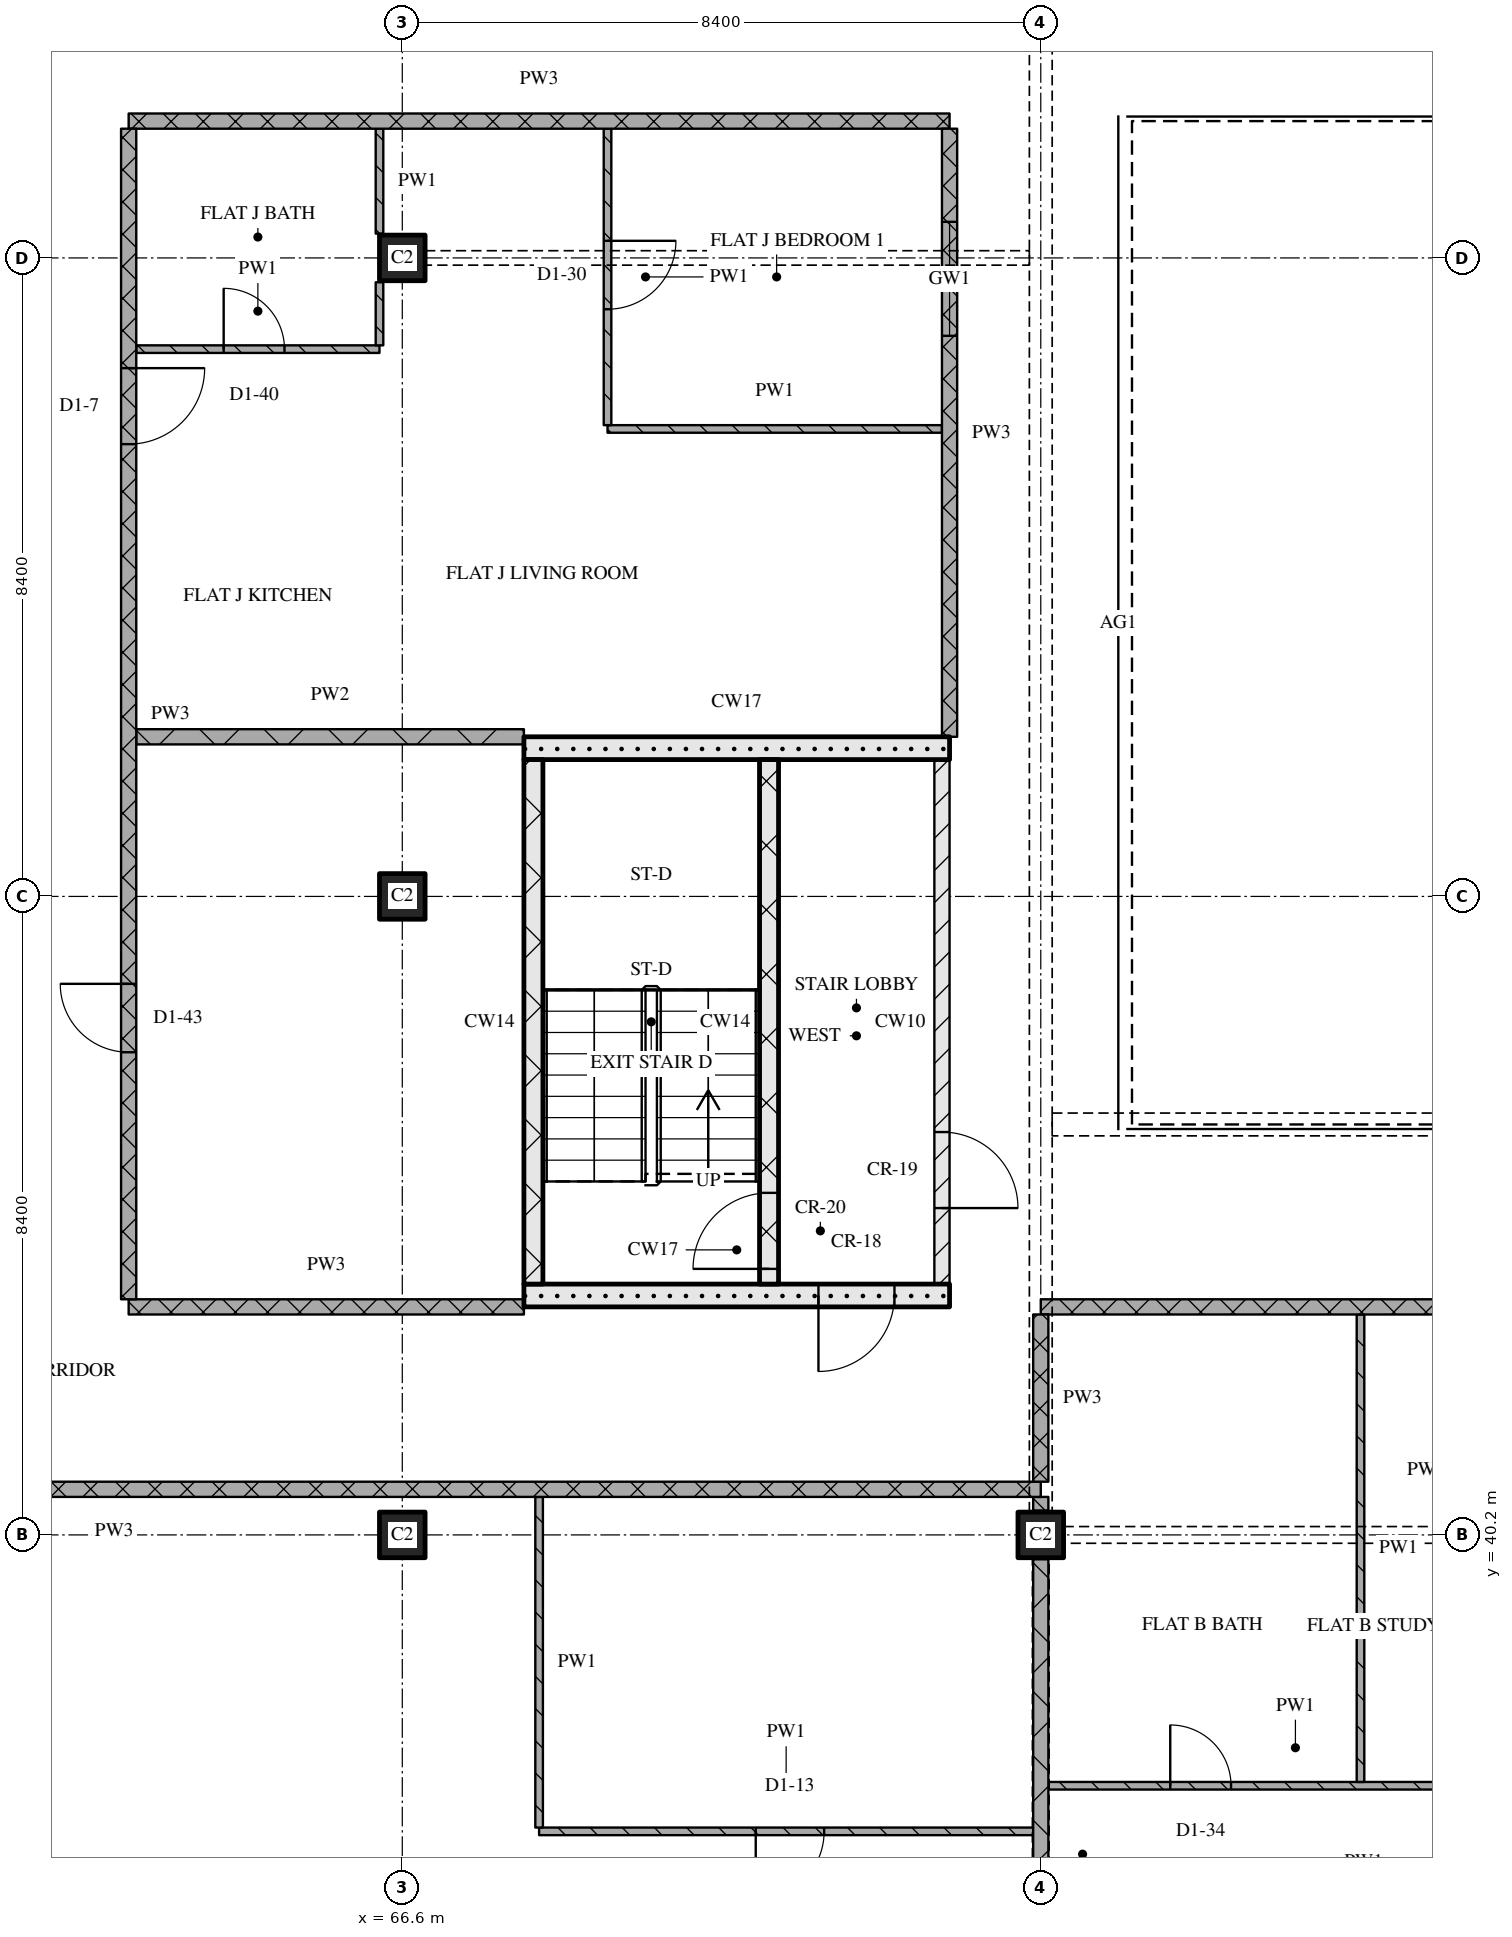
"""IFC4 building model, lengths in metres.
Left out: names, types, materials, properties, quantities, classifications, styles, units other than length and angle.
Written with IfcOpenShell. Run it as: python <this file> out.ifc"""

import sys

from ifc_helpers import new_model, si_unit, direction, frame, frame_2d, origin, origin_2d, place, context, subcontext, project, spatial, rectangle, extrude, element, fill, save


model = new_model("IFC4")
c1 = context("Model", 3, precision=1e-05, world=origin(), true_north=direction((0.0, 1.0)))
c2 = subcontext(c1, "Body", "Model", "MODEL_VIEW")
j1 = project(units=[si_unit("LENGTHUNIT", "METRE"), si_unit("PLANEANGLEUNIT", "RADIAN")], contexts=[c1])
p1 = place(None, origin())
s1 = spatial("IfcSite", under=j1, at=p1, CompositionType="ELEMENT")
p2 = place(p1, origin())
s2 = spatial("IfcBuilding", under=s1, at=p2, CompositionType="ELEMENT")
p3 = place(p2, frame((0.0, 0.0, 212.7)))
s3 = spatial("IfcBuildingStorey", under=s2, at=p3, CompositionType="ELEMENT", Elevation=212.7)
for number, where, z_axis, x_axis in (
    (1, (66.6, 40.2, 0.0), (0.0, 0.0, 1.0), (1.0, 0.0, 0.0)),
    (2, (66.6, 48.6, 0.0), (0.0, 0.0, 1.0), (1.0, 0.0, 0.0)),
    (3, (66.6, 57.0, 0.0), (0.0, 0.0, 1.0), (1.0, 0.0, 0.0)),
    (4, (75.0, 40.2, 0.0), (0.0, 0.0, 1.0), (1.0, 0.0, 0.0)),
):
    element("IfcColumn", number, at=place(p3, frame(where, z_axis=z_axis, x_axis=x_axis)), inside=s3, PredefinedType="COLUMN", context=c2, shape_type="SweptSolid", body=[
        extrude(rectangle(XDim=0.6, YDim=0.6, at=origin_2d()), origin(), (0.0, 0.0, 1.0), 3.6),
    ])
p4 = place(p3, frame((68.2, 43.35, 0.0), z_axis=(0.0, 0.0, 1.0), x_axis=(1.0, 0.0, 0.0)))
e5 = element("IfcWall", 5, at=p4, inside=s3, PredefinedType="SOLIDWALL", context=c2, shape_type="SweptSolid", body=[
    extrude(rectangle(XDim=5.6, YDim=0.3, at=frame_2d((2.8, 0.0))), origin(), (0.0, 0.0, 1.0), 3.32),
])
p5 = place(p4, frame((3.875, 0.0, 0.0)))
e6 = element("IfcOpeningElement", 6, at=p5, cuts=e5, PredefinedType="OPENING", context=c2, shape_type="SweptSolid", body=[
    extrude(rectangle(XDim=1.0, YDim=2.1, at=frame_2d((0.5, 1.05))), frame((0.0, 0.16, 0.0), z_axis=(0.0, -1.0, 0.0), x_axis=(1.0, 0.0, 0.0)), (0.0, 0.0, 1.0), 0.32),
])
p6 = place(p3, frame((68.325, 43.5, 0.0), z_axis=(0.0, 0.0, 1.0), x_axis=(0.0, 1.0, 0.0)))
e7 = element("IfcWall", 7, at=p6, inside=s3, PredefinedType="SOLIDWALL", context=c2, shape_type="SweptSolid", body=[
    extrude(rectangle(XDim=6.9, YDim=0.25, at=frame_2d((3.45, 0.0))), origin(), (0.0, 0.0, 1.0), 3.32),
])
p7 = place(p3, frame((71.425, 43.5, 0.0), z_axis=(0.0, 0.0, 1.0), x_axis=(0.0, 1.0, 0.0)))
e8 = element("IfcWall", 8, at=p7, inside=s3, PredefinedType="SOLIDWALL", context=c2, shape_type="SweptSolid", body=[
    extrude(rectangle(XDim=6.9, YDim=0.25, at=frame_2d((3.45, 0.0))), origin(), (0.0, 0.0, 1.0), 3.32),
])
p8 = place(p7, frame((0.2, 0.0, 0.0)))
e9 = element("IfcOpeningElement", 9, at=p8, cuts=e8, PredefinedType="OPENING", context=c2, shape_type="SweptSolid", body=[
    extrude(rectangle(XDim=1.0, YDim=2.1, at=frame_2d((0.5, 1.05))), frame((0.0, 0.135, 0.0), z_axis=(0.0, -1.0, 0.0), x_axis=(1.0, 0.0, 0.0)), (0.0, 0.0, 1.0), 0.27),
])
p9 = place(p3, frame((73.7, 43.5, 0.0), z_axis=(0.0, 0.0, 1.0), x_axis=(0.0, 1.0, 0.0)))
e10 = element("IfcWall", 10, at=p9, inside=s3, PredefinedType="PARTITIONING", context=c2, shape_type="SweptSolid", body=[
    extrude(rectangle(XDim=6.9, YDim=0.2, at=frame_2d((3.45, 0.0))), origin(), (0.0, 0.0, 1.0), 3.32),
])
p10 = place(p9, frame((1.0, 0.0, 0.0)))
e11 = element("IfcOpeningElement", 11, at=p10, cuts=e10, PredefinedType="OPENING", context=c2, shape_type="SweptSolid", body=[
    extrude(rectangle(XDim=1.0, YDim=2.1, at=frame_2d((0.5, 1.05))), frame((0.0, 0.11, 0.0), z_axis=(0.0, -1.0, 0.0), x_axis=(1.0, 0.0, 0.0)), (0.0, 0.0, 1.0), 0.22),
])
p11 = place(p3, frame((68.2, 50.55, 0.0), z_axis=(0.0, 0.0, 1.0), x_axis=(1.0, 0.0, 0.0)))
e12 = element("IfcWall", 12, at=p11, inside=s3, PredefinedType="SOLIDWALL", context=c2, shape_type="SweptSolid", body=[
    extrude(rectangle(XDim=5.6, YDim=0.3, at=frame_2d((2.8, 0.0))), origin(), (0.0, 0.0, 1.0), 3.32),
])
p12 = place(p3, frame((68.4, 36.3, 0.0), z_axis=(0.0, 0.0, 1.0), x_axis=(1.0, 0.0, 0.0)))
e13 = element("IfcWall", 13, at=p12, inside=s3, PredefinedType="PARTITIONING", context=c2, shape_type="SweptSolid", body=[
    extrude(rectangle(XDim=6.5, YDim=0.1, at=frame_2d((3.25, 0.0))), origin(), (0.0, 0.0, 1.0), 3.32),
])
p13 = place(p12, frame((2.85, 0.0, 0.0)))
e14 = element("IfcOpeningElement", 14, at=p13, cuts=e13, PredefinedType="OPENING", context=c2, shape_type="SweptSolid", body=[
    extrude(rectangle(XDim=0.9, YDim=2.1, at=frame_2d((0.45, 1.05))), frame((0.0, 0.06, 0.0), z_axis=(0.0, -1.0, 0.0), x_axis=(1.0, 0.0, 0.0)), (0.0, 0.0, 1.0), 0.12),
])
p14 = place(p3, frame((75.1, 36.9, 0.0), z_axis=(0.0, 0.0, 1.0), x_axis=(1.0, 0.0, 0.0)))
e15 = element("IfcWall", 15, at=p14, inside=s3, PredefinedType="PARTITIONING", context=c2, shape_type="SweptSolid", body=[
    extrude(rectangle(XDim=6.5, YDim=0.1, at=frame_2d((3.25, 0.0))), origin(), (0.0, 0.0, 1.0), 3.32),
])
p15 = place(p14, frame((1.603, 0.0, 0.0)))
e16 = element("IfcOpeningElement", 16, at=p15, cuts=e15, PredefinedType="OPENING", context=c2, shape_type="SweptSolid", body=[
    extrude(rectangle(XDim=0.8, YDim=2.1, at=frame_2d((0.4, 1.05))), frame((0.0, 0.06, 0.0), z_axis=(0.0, -1.0, 0.0), x_axis=(1.0, 0.0, 0.0)), (0.0, 0.0, 1.0), 0.12),
])
p16 = place(p3, frame((75.0, 40.8, 0.0), z_axis=(0.0, 0.0, 1.0), x_axis=(-1.0, 0.0, 0.0)))
e17 = element("IfcWall", 17, at=p16, inside=s3, PredefinedType="PARTITIONING", context=c2, shape_type="SweptSolid", body=[
    extrude(rectangle(XDim=24.38, YDim=0.2, at=frame_2d((12.19, 0.0))), origin(), (0.0, 0.0, 1.0), 3.32),
])
p17 = place(p16, frame((14.35, 0.0, 0.0)))
e18 = element("IfcOpeningElement", 18, at=p17, cuts=e17, PredefinedType="OPENING", context=c2, shape_type="SweptSolid", body=[
    extrude(rectangle(XDim=1.0, YDim=2.1, at=frame_2d((0.5, 1.05))), frame((0.0, 0.11, 0.0), z_axis=(0.0, -1.0, 0.0), x_axis=(1.0, 0.0, 0.0)), (0.0, 0.0, 1.0), 0.22),
])
p18 = place(p3, frame((63.0, 43.2, 0.0), z_axis=(0.0, 0.0, 1.0), x_axis=(1.0, 0.0, 0.0)))
e19 = element("IfcWall", 19, at=p18, inside=s3, PredefinedType="PARTITIONING", context=c2, shape_type="SweptSolid", body=[
    extrude(rectangle(XDim=5.2, YDim=0.2, at=frame_2d((2.6, 0.0))), origin(), (0.0, 0.0, 1.0), 3.32),
])
p19 = place(p3, frame((100.2, 43.2, 0.0), z_axis=(0.0, 0.0, 1.0), x_axis=(-1.0, 0.0, 0.0)))
e20 = element("IfcWall", 20, at=p19, inside=s3, PredefinedType="PARTITIONING", context=c2, shape_type="SweptSolid", body=[
    extrude(rectangle(XDim=25.2, YDim=0.2, at=frame_2d((12.6, 0.0))), origin(), (0.0, 0.0, 1.0), 3.32),
])
p20 = place(p19, frame((4.15, 0.0, 0.0)))
e21 = element("IfcOpeningElement", 21, at=p20, cuts=e20, PredefinedType="OPENING", context=c2, shape_type="SweptSolid", body=[
    extrude(rectangle(XDim=1.0, YDim=2.1, at=frame_2d((0.5, 1.05))), frame((0.0, 0.11, 0.0), z_axis=(0.0, -1.0, 0.0), x_axis=(1.0, 0.0, 0.0)), (0.0, 0.0, 1.0), 0.22),
])
p21 = place(p19, frame((17.35, 0.0, 0.0)))
e22 = element("IfcOpeningElement", 22, at=p21, cuts=e20, PredefinedType="OPENING", context=c2, shape_type="SweptSolid", body=[
    extrude(rectangle(XDim=1.0, YDim=2.1, at=frame_2d((0.5, 1.05))), frame((0.0, 0.11, 0.0), z_axis=(0.0, -1.0, 0.0), x_axis=(1.0, 0.0, 0.0)), (0.0, 0.0, 1.0), 0.22),
])
p22 = place(p3, frame((63.1, 50.7, 0.0), z_axis=(0.0, 0.0, 1.0), x_axis=(1.0, 0.0, 0.0)))
e23 = element("IfcWall", 23, at=p22, inside=s3, PredefinedType="PARTITIONING", context=c2, shape_type="SweptSolid", body=[
    extrude(rectangle(XDim=5.1, YDim=0.2, at=frame_2d((2.55, 0.0))), origin(), (0.0, 0.0, 1.0), 3.32),
])
p23 = place(p3, frame((69.3, 54.75, 0.0), z_axis=(0.0, 0.0, 1.0), x_axis=(1.0, 0.0, 0.0)))
e24 = element("IfcWall", 24, at=p23, inside=s3, PredefinedType="PARTITIONING", context=c2, shape_type="SweptSolid", body=[
    extrude(rectangle(XDim=4.4, YDim=0.1, at=frame_2d((2.2, 0.0))), origin(), (0.0, 0.0, 1.0), 3.32),
])
p24 = place(p3, frame((63.1, 55.8, 0.0), z_axis=(0.0, 0.0, 1.0), x_axis=(1.0, 0.0, 0.0)))
e25 = element("IfcWall", 25, at=p24, inside=s3, PredefinedType="PARTITIONING", context=c2, shape_type="SweptSolid", body=[
    extrude(rectangle(XDim=3.2, YDim=0.1, at=frame_2d((1.6, 0.0))), origin(), (0.0, 0.0, 1.0), 3.32),
])
p25 = place(p24, frame((1.15, 0.0, 0.0)))
e26 = element("IfcOpeningElement", 26, at=p25, cuts=e25, PredefinedType="OPENING", context=c2, shape_type="SweptSolid", body=[
    extrude(rectangle(XDim=0.8, YDim=2.1, at=frame_2d((0.4, 1.05))), frame((0.0, 0.06, 0.0), z_axis=(0.0, -1.0, 0.0), x_axis=(1.0, 0.0, 0.0)), (0.0, 0.0, 1.0), 0.12),
])
p26 = place(p3, frame((63.0, 58.8, 0.0), z_axis=(0.0, 0.0, 1.0), x_axis=(1.0, 0.0, 0.0)))
e27 = element("IfcWall", 27, at=p26, inside=s3, PredefinedType="PARTITIONING", context=c2, shape_type="SweptSolid", body=[
    extrude(rectangle(XDim=10.8, YDim=0.2, at=frame_2d((5.4, 0.0))), origin(), (0.0, 0.0, 1.0), 3.32),
])
p27 = place(p3, frame((63.0, 58.7, 0.0), z_axis=(0.0, 0.0, 1.0), x_axis=(0.0, -1.0, 0.0)))
e28 = element("IfcWall", 28, at=p27, inside=s3, PredefinedType="PARTITIONING", context=c2, shape_type="SweptSolid", body=[
    extrude(rectangle(XDim=15.4, YDim=0.2, at=frame_2d((7.7, 0.0))), origin(), (0.0, 0.0, 1.0), 3.32),
])
p28 = place(p27, frame((3.15, 0.0, 0.0)))
e29 = element("IfcOpeningElement", 29, at=p28, cuts=e28, PredefinedType="OPENING", context=c2, shape_type="SweptSolid", body=[
    extrude(rectangle(XDim=1.0, YDim=2.1, at=frame_2d((0.5, 1.05))), frame((0.0, 0.11, 0.0), z_axis=(0.0, -1.0, 0.0), x_axis=(1.0, 0.0, 0.0)), (0.0, 0.0, 1.0), 0.22),
])
p29 = place(p27, frame((11.25, 0.0, 0.0)))
e30 = element("IfcOpeningElement", 30, at=p29, cuts=e28, PredefinedType="OPENING", context=c2, shape_type="SweptSolid", body=[
    extrude(rectangle(XDim=0.9, YDim=2.1, at=frame_2d((0.45, 1.05))), frame((0.0, 0.11, 0.0), z_axis=(0.0, -1.0, 0.0), x_axis=(1.0, 0.0, 0.0)), (0.0, 0.0, 1.0), 0.22),
])
p30 = place(p3, frame((66.3, 56.68, 0.0), z_axis=(0.0, 0.0, 1.0), x_axis=(0.0, -1.0, 0.0)))
e31 = element("IfcWall", 31, at=p30, inside=s3, PredefinedType="PARTITIONING", context=c2, shape_type="SweptSolid", body=[
    extrude(rectangle(XDim=0.83, YDim=0.1, at=frame_2d((0.415, 0.0))), origin(), (0.0, 0.0, 1.0), 3.32),
])
p31 = place(p3, frame((66.3, 58.7, 0.0), z_axis=(0.0, 0.0, 1.0), x_axis=(0.0, -1.0, 0.0)))
e32 = element("IfcWall", 32, at=p31, inside=s3, PredefinedType="PARTITIONING", context=c2, shape_type="SweptSolid", body=[
    extrude(rectangle(XDim=1.38, YDim=0.1, at=frame_2d((0.69, 0.0))), origin(), (0.0, 0.0, 1.0), 3.32),
])
p32 = place(p3, frame((68.4, 40.7, 0.0), z_axis=(0.0, 0.0, 1.0), x_axis=(0.0, -1.0, 0.0)))
e33 = element("IfcWall", 33, at=p32, inside=s3, PredefinedType="PARTITIONING", context=c2, shape_type="SweptSolid", body=[
    extrude(rectangle(XDim=4.35, YDim=0.1, at=frame_2d((2.175, 0.0))), origin(), (0.0, 0.0, 1.0), 3.32),
])
p33 = place(p3, frame((69.3, 58.7, 0.0), z_axis=(0.0, 0.0, 1.0), x_axis=(0.0, -1.0, 0.0)))
e34 = element("IfcWall", 34, at=p33, inside=s3, PredefinedType="PARTITIONING", context=c2, shape_type="SweptSolid", body=[
    extrude(rectangle(XDim=3.9, YDim=0.1, at=frame_2d((1.95, 0.0))), origin(), (0.0, 0.0, 1.0), 3.32),
])
p34 = place(p33, frame((1.475, 0.0, 0.0)))
e35 = element("IfcOpeningElement", 35, at=p34, cuts=e34, PredefinedType="OPENING", context=c2, shape_type="SweptSolid", body=[
    extrude(rectangle(XDim=0.9, YDim=2.1, at=frame_2d((0.45, 1.05))), frame((0.0, 0.06, 0.0), z_axis=(0.0, -1.0, 0.0), x_axis=(1.0, 0.0, 0.0)), (0.0, 0.0, 1.0), 0.12),
])
p35 = place(p3, frame((73.8, 58.7, 0.0), z_axis=(0.0, 0.0, 1.0), x_axis=(0.0, -1.0, 0.0)))
e36 = element("IfcWall", 36, at=p35, inside=s3, PredefinedType="PARTITIONING", context=c2, shape_type="SweptSolid", body=[
    extrude(rectangle(XDim=8.0, YDim=0.2, at=frame_2d((4.0, 0.0))), origin(), (0.0, 0.0, 1.0), 3.32),
])
p36 = place(p35, frame((1.225, 0.0, 0.9)))
e37 = element("IfcOpeningElement", 37, at=p36, cuts=e36, PredefinedType="OPENING", context=c2, shape_type="SweptSolid", body=[
    extrude(rectangle(XDim=1.5, YDim=1.5, at=frame_2d((0.75, 0.75))), frame((0.0, 0.11, 0.0), z_axis=(0.0, -1.0, 0.0), x_axis=(1.0, 0.0, 0.0)), (0.0, 0.0, 1.0), 0.22),
])
p37 = place(p3, frame((75.0, 43.1, 0.0), z_axis=(0.0, 0.0, 1.0), x_axis=(0.0, -1.0, 0.0)))
e38 = element("IfcWall", 38, at=p37, inside=s3, PredefinedType="PARTITIONING", context=c2, shape_type="SweptSolid", body=[
    extrude(rectangle(XDim=2.2, YDim=0.2, at=frame_2d((1.1, 0.0))), origin(), (0.0, 0.0, 1.0), 2.53),
])
p38 = place(p3, frame((75.0, 39.88, 0.0), z_axis=(0.0, 0.0, 1.0), x_axis=(0.0, -1.0, 0.0)))
e39 = element("IfcWall", 39, at=p38, inside=s3, PredefinedType="PARTITIONING", context=c2, shape_type="SweptSolid", body=[
    extrude(rectangle(XDim=7.76, YDim=0.2, at=frame_2d((3.88, 0.0))), origin(), (0.0, 0.0, 1.0), 2.72),
])
p39 = place(p3, frame((75.0, 40.7, 0.0), z_axis=(0.0, 0.0, 1.0), x_axis=(0.0, -1.0, 0.0)))
e40 = element("IfcWall", 40, at=p39, inside=s3, PredefinedType="PARTITIONING", context=c2, shape_type="SweptSolid", body=[
    extrude(rectangle(XDim=0.18, YDim=0.2, at=frame_2d((0.09, 0.0))), origin(), (0.0, 0.0, 1.0), 3.32),
])
p40 = place(p3, frame((79.206, 43.1, 0.0), z_axis=(0.0, 0.0, 1.0), x_axis=(0.0, -1.0, 0.0)))
e41 = element("IfcWall", 41, at=p40, inside=s3, PredefinedType="PARTITIONING", context=c2, shape_type="SweptSolid", body=[
    extrude(rectangle(XDim=6.15, YDim=0.1, at=frame_2d((3.075, 0.0))), origin(), (0.0, 0.0, 1.0), 3.32),
])
p41 = place(p5, origin())
e42 = element("IfcDoor", 42, at=p41, inside=s3, OperationType="SINGLE_SWING_RIGHT", PredefinedType="DOOR", context=c2, shape_type="SweptSolid", body=[
    extrude(rectangle(XDim=1.0, YDim=2.1, at=frame_2d((0.5, 1.05))), frame((0.0, 0.025, 0.0), z_axis=(0.0, -1.0, 0.0), x_axis=(1.0, 0.0, 0.0)), (0.0, 0.0, 1.0), 0.05),
])
fill(e6, e42)
p42 = place(p8, origin())
e43 = element("IfcDoor", 43, at=p42, inside=s3, OperationType="SINGLE_SWING_LEFT", PredefinedType="DOOR", context=c2, shape_type="SweptSolid", body=[
    extrude(rectangle(XDim=1.0, YDim=2.1, at=frame_2d((0.5, 1.05))), frame((0.0, 0.025, 0.0), z_axis=(0.0, -1.0, 0.0), x_axis=(1.0, 0.0, 0.0)), (0.0, 0.0, 1.0), 0.05),
])
fill(e9, e43)
p43 = place(p10, origin())
e44 = element("IfcDoor", 44, at=p43, inside=s3, OperationType="SINGLE_SWING_RIGHT", PredefinedType="DOOR", context=c2, shape_type="SweptSolid", body=[
    extrude(rectangle(XDim=1.0, YDim=2.1, at=frame_2d((0.5, 1.05))), frame((0.0, 0.025, 0.0), z_axis=(0.0, -1.0, 0.0), x_axis=(1.0, 0.0, 0.0)), (0.0, 0.0, 1.0), 0.05),
])
fill(e11, e44)
p44 = place(p13, origin())
e45 = element("IfcDoor", 45, at=p44, inside=s3, OperationType="SINGLE_SWING_RIGHT", PredefinedType="DOOR", context=c2, shape_type="SweptSolid", body=[
    extrude(rectangle(XDim=0.9, YDim=2.1, at=frame_2d((0.45, 1.05))), frame((0.0, 0.025, 0.0), z_axis=(0.0, -1.0, 0.0), x_axis=(1.0, 0.0, 0.0)), (0.0, 0.0, 1.0), 0.05),
])
fill(e14, e45)
p45 = place(p15, origin())
e46 = element("IfcDoor", 46, at=p45, inside=s3, OperationType="SINGLE_SWING_LEFT", PredefinedType="DOOR", context=c2, shape_type="SweptSolid", body=[
    extrude(rectangle(XDim=0.8, YDim=2.1, at=frame_2d((0.4, 1.05))), frame((0.0, 0.025, 0.0), z_axis=(0.0, -1.0, 0.0), x_axis=(1.0, 0.0, 0.0)), (0.0, 0.0, 1.0), 0.05),
])
fill(e16, e46)
p46 = place(p25, origin())
e47 = element("IfcDoor", 47, at=p46, inside=s3, OperationType="SINGLE_SWING_LEFT", PredefinedType="DOOR", context=c2, shape_type="SweptSolid", body=[
    extrude(rectangle(XDim=0.8, YDim=2.1, at=frame_2d((0.4, 1.05))), frame((0.0, 0.025, 0.0), z_axis=(0.0, -1.0, 0.0), x_axis=(1.0, 0.0, 0.0)), (0.0, 0.0, 1.0), 0.05),
])
fill(e26, e47)
p47 = place(p28, origin())
e48 = element("IfcDoor", 48, at=p47, inside=s3, OperationType="SINGLE_SWING_LEFT", PredefinedType="DOOR", context=c2, shape_type="SweptSolid", body=[
    extrude(rectangle(XDim=1.0, YDim=2.1, at=frame_2d((0.5, 1.05))), frame((0.0, 0.025, 0.0), z_axis=(0.0, -1.0, 0.0), x_axis=(1.0, 0.0, 0.0)), (0.0, 0.0, 1.0), 0.05),
])
fill(e29, e48)
p48 = place(p29, origin())
e49 = element("IfcDoor", 49, at=p48, inside=s3, OperationType="SINGLE_SWING_RIGHT", PredefinedType="DOOR", context=c2, shape_type="SweptSolid", body=[
    extrude(rectangle(XDim=0.9, YDim=2.1, at=frame_2d((0.45, 1.05))), frame((0.0, 0.025, 0.0), z_axis=(0.0, -1.0, 0.0), x_axis=(1.0, 0.0, 0.0)), (0.0, 0.0, 1.0), 0.05),
])
fill(e30, e49)
p49 = place(p34, origin())
e50 = element("IfcDoor", 50, at=p49, inside=s3, OperationType="SINGLE_SWING_LEFT", PredefinedType="DOOR", context=c2, shape_type="SweptSolid", body=[
    extrude(rectangle(XDim=0.9, YDim=2.1, at=frame_2d((0.45, 1.05))), frame((0.0, 0.025, 0.0), z_axis=(0.0, -1.0, 0.0), x_axis=(1.0, 0.0, 0.0)), (0.0, 0.0, 1.0), 0.05),
])
fill(e35, e50)
p50 = place(p36, origin())
e51 = element("IfcWindow", 51, at=p50, inside=s3, PartitioningType="SINGLE_PANEL", PredefinedType="WINDOW", context=c2, shape_type="SweptSolid", body=[
    extrude(rectangle(XDim=1.5, YDim=1.5, at=frame_2d((0.75, 0.75))), frame((0.0, 0.03, 0.0), z_axis=(0.0, -1.0, 0.0), x_axis=(1.0, 0.0, 0.0)), (0.0, 0.0, 1.0), 0.06),
])
fill(e37, e51)
save(model, sys.argv[1])
